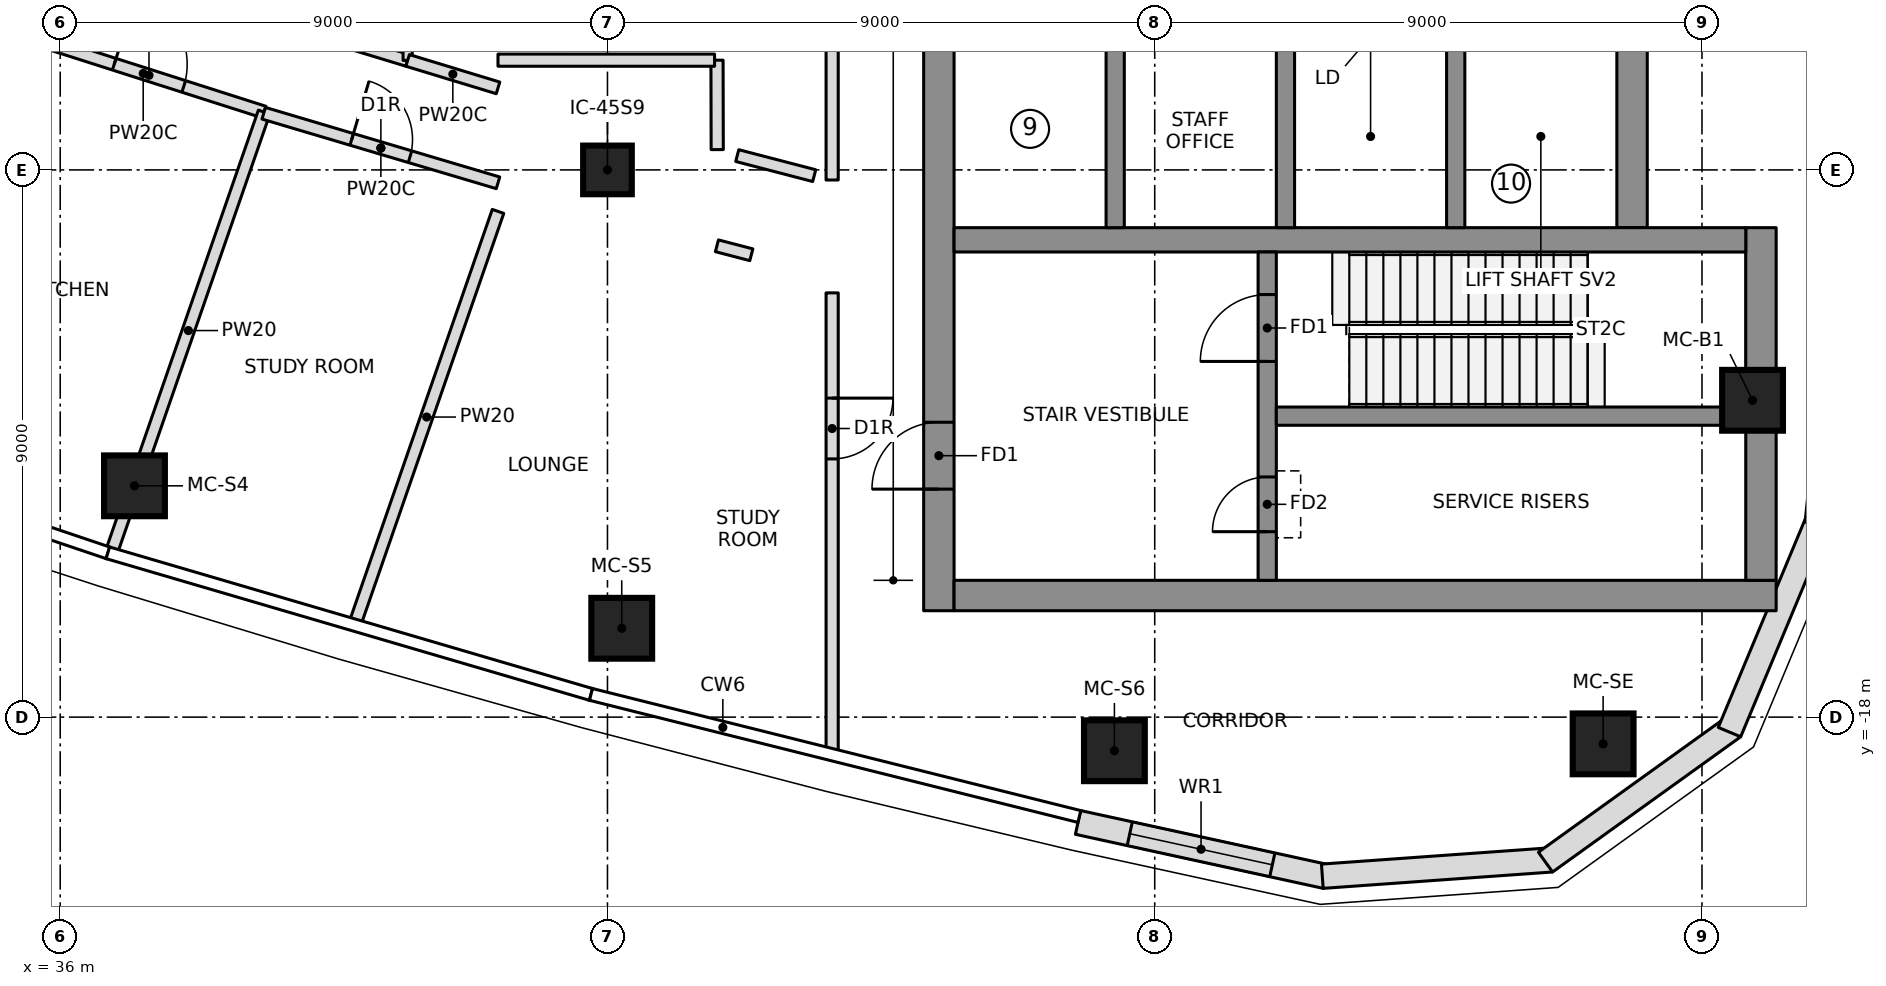
"""IFC4 building model, lengths in metres.
Left out: names, types, materials, properties, quantities, classifications, styles, units other than length and angle.
Written with IfcOpenShell. Run it as: python <this file> out.ifc"""

import sys

from ifc_helpers import new_model, si_unit, direction, frame, frame_2d, origin, origin_2d, place, context, subcontext, project, spatial, polyline, rectangle, outline, extrude, element, fill, save


model = new_model("IFC4")
c1 = context("Model", 3, precision=1e-05, world=origin(), true_north=direction((0.0, 1.0)))
c2 = subcontext(c1, "Body", "Model", "MODEL_VIEW")
j1 = project(units=[si_unit("LENGTHUNIT", "METRE"), si_unit("PLANEANGLEUNIT", "RADIAN")], contexts=[c1])
p1 = place(None, origin())
s1 = spatial("IfcSite", under=j1, at=p1, CompositionType="ELEMENT")
p2 = place(p1, origin())
s2 = spatial("IfcBuilding", under=s1, at=p2, CompositionType="ELEMENT")
p3 = place(p2, frame((0.0, 0.0, 313.2)))
s3 = spatial("IfcBuildingStorey", under=s2, at=p3, CompositionType="ELEMENT", Elevation=313.2)
p4 = place(p3, frame((50.45, -16.25, 0.0), z_axis=(0.0, 0.0, 1.0), x_axis=(0.0, 1.0, 0.0)))
e1 = element("IfcWall", 1, at=p4, inside=s3, PredefinedType="SHEAR", context=c2, shape_type="SweptSolid", body=[
    extrude(rectangle(XDim=9.6, YDim=0.5, at=frame_2d((4.8, 0.0))), origin(), (0.0, 0.0, 1.0), 5.4),
])
p5 = place(p4, frame((2.0, 0.0, 0.0)))
e2 = element("IfcOpeningElement", 2, at=p5, cuts=e1, PredefinedType="OPENING", context=c2, shape_type="SweptSolid", body=[
    extrude(rectangle(XDim=1.1, YDim=2.1, at=frame_2d((0.55, 1.05))), frame((0.0, 0.26, 0.0), z_axis=(0.0, -1.0, 0.0), x_axis=(1.0, 0.0, 0.0)), (0.0, 0.0, 1.0), 0.52),
])
p6 = place(p3, frame((50.7, -16.0, 0.0), z_axis=(0.0, 0.0, 1.0), x_axis=(1.0, 0.0, 0.0)))
e3 = element("IfcWall", 3, at=p6, inside=s3, PredefinedType="SHEAR", context=c2, shape_type="SweptSolid", body=[
    extrude(rectangle(XDim=13.52, YDim=0.5, at=frame_2d((6.76, 0.0))), origin(), (0.0, 0.0, 1.0), 5.4),
])
p7 = place(p3, frame((63.97, -15.75, 0.0), z_axis=(0.0, 0.0, 1.0), x_axis=(0.0, 1.0, 0.0)))
e4 = element("IfcWall", 4, at=p7, inside=s3, PredefinedType="SHEAR", context=c2, shape_type="SweptSolid", body=[
    extrude(rectangle(XDim=5.8, YDim=0.5, at=frame_2d((2.9, 0.0))), origin(), (0.0, 0.0, 1.0), 5.4),
])
p8 = place(p3, frame((61.85, -9.95, 0.0), z_axis=(0.0, 0.0, 1.0), x_axis=(0.0, 1.0, 0.0)))
e5 = element("IfcWall", 5, at=p8, inside=s3, PredefinedType="SHEAR", context=c2, shape_type="SweptSolid", body=[
    extrude(rectangle(XDim=19.9, YDim=0.5, at=frame_2d((9.95, 0.0))), origin(), (0.0, 0.0, 1.0), 5.4),
])
p9 = place(p3, frame((50.7, -10.15, 0.0), z_axis=(0.0, 0.0, 1.0), x_axis=(1.0, 0.0, 0.0)))
e6 = element("IfcWall", 6, at=p9, inside=s3, PredefinedType="SHEAR", context=c2, shape_type="SweptSolid", body=[
    extrude(rectangle(XDim=13.02, YDim=0.4, at=frame_2d((6.51, 0.0))), origin(), (0.0, 0.0, 1.0), 5.4),
])
for number, where, z_axis, x_axis in (
    (7, (53.35, -9.95, 0.0), (0.0, 0.0, 1.0), (0.0, 1.0, 0.0)),
    (8, (56.15, -9.95, 0.0), (0.0, 0.0, 1.0), (0.0, 1.0, 0.0)),
    (9, (58.95, -9.95, 0.0), (0.0, 0.0, 1.0), (0.0, 1.0, 0.0)),
):
    element("IfcWall", number, at=place(p3, frame(where, z_axis=z_axis, x_axis=x_axis)), inside=s3, PredefinedType="SHEAR", context=c2, shape_type="SweptSolid", body=[
        extrude(rectangle(XDim=3.0, YDim=0.3, at=frame_2d((1.5, 0.0))), origin(), (0.0, 0.0, 1.0), 5.4),
    ])
p10 = place(p3, frame((55.85, -15.75, 0.0), z_axis=(0.0, 0.0, 1.0), x_axis=(0.0, 1.0, 0.0)))
e10 = element("IfcWall", 10, at=p10, inside=s3, PredefinedType="SHEAR", context=c2, shape_type="SweptSolid", body=[
    extrude(rectangle(XDim=5.4, YDim=0.3, at=frame_2d((2.7, 0.0))), origin(), (0.0, 0.0, 1.0), 5.4),
])
p11 = place(p10, frame((3.6, 0.0, 0.0)))
e11 = element("IfcOpeningElement", 11, at=p11, cuts=e10, PredefinedType="OPENING", context=c2, shape_type="SweptSolid", body=[
    extrude(rectangle(XDim=1.1, YDim=2.1, at=frame_2d((0.55, 1.05))), frame((0.0, 0.16, 0.0), z_axis=(0.0, -1.0, 0.0), x_axis=(1.0, 0.0, 0.0)), (0.0, 0.0, 1.0), 0.32),
])
p12 = place(p10, frame((0.8, 0.0, 0.0)))
e12 = element("IfcOpeningElement", 12, at=p12, cuts=e10, PredefinedType="OPENING", context=c2, shape_type="SweptSolid", body=[
    extrude(rectangle(XDim=0.9, YDim=2.1, at=frame_2d((0.45, 1.05))), frame((0.0, 0.16, 0.0), z_axis=(0.0, -1.0, 0.0), x_axis=(1.0, 0.0, 0.0)), (0.0, 0.0, 1.0), 0.32),
])
p13 = place(p3, frame((56.0, -13.05, 0.0), z_axis=(0.0, 0.0, 1.0), x_axis=(1.0, 0.0, 0.0)))
e13 = element("IfcWall", 13, at=p13, inside=s3, PredefinedType="SHEAR", context=c2, shape_type="SweptSolid", body=[
    extrude(rectangle(XDim=7.72, YDim=0.3, at=frame_2d((3.86, 0.0))), origin(), (0.0, 0.0, 1.0), 5.4),
])
for number, where, z_axis, x_axis in (
    (14, (37.221, -14.196, 0.0), (0.0, 0.0, 1.0), (1.0, 0.0, 0.0)),
    (15, (45.235, -16.539, 0.0), (0.0, 0.0, 1.0), (1.0, 0.0, 0.0)),
    (16, (53.337, -18.553, 0.0), (0.0, 0.0, 1.0), (1.0, 0.0, 0.0)),
    (17, (61.374, -18.44, 0.0), (0.0, 0.0, 1.0), (1.0, 0.0, 0.0)),
    (18, (63.832, -12.789, 0.0), (0.0, 0.0, 1.0), (1.0, 0.0, 0.0)),
):
    element("IfcColumn", number, at=place(p3, frame(where, z_axis=z_axis, x_axis=x_axis)), inside=s3, PredefinedType="COLUMN", context=c2, shape_type="SweptSolid", body=[
        extrude(rectangle(XDim=1.0, YDim=1.0, at=origin_2d()), origin(), (0.0, 0.0, 1.0), 5.4),
    ])
p14 = place(p3, frame((45.0, -9.0, 0.0), z_axis=(0.0, 0.0, 1.0), x_axis=(1.0, 0.0, 0.0)))
e19 = element("IfcColumn", 19, at=p14, inside=s3, PredefinedType="COLUMN", context=c2, shape_type="SweptSolid", body=[
    extrude(rectangle(XDim=0.8, YDim=0.8, at=origin_2d()), origin(), (0.0, 0.0, 1.0), 5.4),
])
p15 = place(p3, frame((52.738, -19.732, 0.0), z_axis=(0.0, 0.0, 1.0), x_axis=(0.977020225348, -0.213146614471, 0.0)))
e20 = element("IfcWall", 20, at=p15, inside=s3, PredefinedType="NOTDEFINED", context=c2, shape_type="SweptSolid", body=[
    extrude(outline(polyline([(0.0, -0.2), (4.171, -0.2), (4.113, 0.2), (0.0, 0.2), (0.0, -0.2)])), origin(), (0.0, 0.0, 1.0), 5.1),
])
p16 = place(p15, frame((0.871, 0.0, 0.3)))
e21 = element("IfcOpeningElement", 21, at=p16, cuts=e20, PredefinedType="OPENING", context=c2, shape_type="SweptSolid", body=[
    extrude(rectangle(XDim=2.4, YDim=3.0, at=frame_2d((1.2, 1.5))), frame((0.0, 0.21, 0.0), z_axis=(0.0, -1.0, 0.0), x_axis=(1.0, 0.0, 0.0)), (0.0, 0.0, 1.0), 0.42),
])
p17 = place(p3, frame((56.785, -20.615, 0.0), z_axis=(0.0, 0.0, 1.0), x_axis=(0.99746272096, 0.071190731806, 0.0)))
e22 = element("IfcWall", 22, at=p17, inside=s3, PredefinedType="NOTDEFINED", context=c2, shape_type="SweptSolid", body=[
    extrude(outline(polyline([(-0.029, -0.2), (3.753, -0.2), (3.64, 0.2), (0.029, 0.2), (-0.029, -0.2)])), origin(), (0.0, 0.0, 1.0), 5.1),
])
p18 = place(p3, frame((60.472, -20.352, 0.0), z_axis=(0.0, 0.0, 1.0), x_axis=(0.811962548682, 0.583709533533, 0.0)))
e23 = element("IfcWall", 23, at=p18, inside=s3, PredefinedType="NOTDEFINED", context=c2, shape_type="SweptSolid", body=[
    extrude(outline(polyline([(-0.057, -0.2), (3.753, -0.2), (3.64, 0.2), (0.057, 0.2), (-0.057, -0.2)])), origin(), (0.0, 0.0, 1.0), 5.1),
])
p19 = place(p3, frame((63.474, -18.194, 0.0), z_axis=(0.0, 0.0, 1.0), x_axis=(0.385285857918, 0.922797273343, 0.0)))
e24 = element("IfcWall", 24, at=p19, inside=s3, PredefinedType="NOTDEFINED", context=c2, shape_type="SweptSolid", body=[
    extrude(outline(polyline([(-0.057, -0.2), (3.726, -0.2), (3.667, 0.2), (0.057, 0.2), (-0.057, -0.2)])), origin(), (0.0, 0.0, 1.0), 5.1),
])
p20 = place(p3, frame((64.898, -14.782, 0.0), z_axis=(0.0, 0.0, 1.0), x_axis=(0.102249826987, 0.994758751096, 0.0)))
e25 = element("IfcWall", 25, at=p20, inside=s3, PredefinedType="NOTDEFINED", context=c2, shape_type="SweptSolid", body=[
    extrude(outline(polyline([(-0.03, -0.2), (4.237, -0.2), (4.23, 0.2), (0.03, 0.2), (-0.03, -0.2)])), origin(), (0.0, 0.0, 1.0), 5.1),
])
p21 = place(p20, frame((1.417, 0.0, 0.3)))
e26 = element("IfcOpeningElement", 26, at=p21, cuts=e25, PredefinedType="OPENING", context=c2, shape_type="SweptSolid", body=[
    extrude(rectangle(XDim=2.4, YDim=3.0, at=frame_2d((1.2, 1.5))), frame((0.0, 0.21, 0.0), z_axis=(0.0, -1.0, 0.0), x_axis=(1.0, 0.0, 0.0)), (0.0, 0.0, 1.0), 0.42),
])
p22 = place(p3, frame((35.376, -6.779, 0.0), z_axis=(0.0, 0.0, 1.0), x_axis=(0.952572699992, -0.304311109278, 0.0)))
e27 = element("IfcWall", 27, at=p22, inside=s3, PredefinedType="PARTITIONING", context=c2, shape_type="SweptSolid", body=[
    extrude(rectangle(XDim=4.176, YDim=0.2, at=frame_2d((2.088, 0.0))), origin(), (0.0, 0.0, 1.0), 5.1),
])
p23 = place(p22, frame((1.588, 0.0, 0.0)))
e28 = element("IfcOpeningElement", 28, at=p23, cuts=e27, PredefinedType="OPENING", context=c2, shape_type="SweptSolid", body=[
    extrude(rectangle(XDim=1.2, YDim=2.1, at=frame_2d((0.6, 1.05))), frame((0.0, 0.11, 0.0), z_axis=(0.0, -1.0, 0.0), x_axis=(1.0, 0.0, 0.0)), (0.0, 0.0, 1.0), 0.22),
])
p24 = place(p3, frame((36.861, -15.235, 0.0), z_axis=(0.0, 0.0, 1.0), x_axis=(0.327741126954, 0.944767565967, 0.0)))
e29 = element("IfcWall", 29, at=p24, inside=s3, PredefinedType="PARTITIONING", context=c2, shape_type="SweptSolid", body=[
    extrude(rectangle(XDim=7.606, YDim=0.2, at=frame_2d((3.803, 0.0))), origin(), (0.0, 0.0, 1.0), 5.1),
])
p25 = place(p3, frame((39.347, -8.068, 0.0), z_axis=(0.0, 0.0, 1.0), x_axis=(0.958623301067, -0.284677653938, 0.0)))
e30 = element("IfcWall", 30, at=p25, inside=s3, PredefinedType="PARTITIONING", context=c2, shape_type="SweptSolid", body=[
    extrude(rectangle(XDim=4.02, YDim=0.2, at=frame_2d((2.01, 0.0))), origin(), (0.0, 0.0, 1.0), 5.1),
])
p26 = place(p25, frame((1.51, 0.0, 0.0)))
e31 = element("IfcOpeningElement", 31, at=p26, cuts=e30, PredefinedType="OPENING", context=c2, shape_type="SweptSolid", body=[
    extrude(rectangle(XDim=1.0, YDim=2.1, at=frame_2d((0.5, 1.05))), frame((0.0, 0.11, 0.0), z_axis=(0.0, -1.0, 0.0), x_axis=(1.0, 0.0, 0.0)), (0.0, 0.0, 1.0), 0.22),
])
p27 = place(p3, frame((40.854, -16.447, 0.0), z_axis=(0.0, 0.0, 1.0), x_axis=(0.327701896972, 0.944781173987, 0.0)))
e32 = element("IfcWall", 32, at=p27, inside=s3, PredefinedType="PARTITIONING", context=c2, shape_type="SweptSolid", body=[
    extrude(rectangle(XDim=7.16, YDim=0.2, at=frame_2d((3.58, 0.0))), origin(), (0.0, 0.0, 1.0), 5.1),
])
p28 = place(p3, frame((46.8, -10.248, 0.0), z_axis=(0.0, 0.0, 1.0), x_axis=(0.967635017449, -0.252353864654, 0.0)))
e33 = element("IfcWall", 33, at=p28, inside=s3, PredefinedType="PARTITIONING", context=c2, shape_type="SweptSolid", body=[
    extrude(rectangle(XDim=0.584, YDim=0.2, at=frame_2d((0.292, 0.0))), origin(), (0.0, 0.0, 1.0), 5.1),
])
p29 = place(p3, frame((41.714, -7.199, 0.0), z_axis=(0.0, 0.0, 1.0), x_axis=(-0.956735130354, 0.290960289981, 0.0)))
e34 = element("IfcWall", 34, at=p29, inside=s3, PredefinedType="PARTITIONING", context=c2, shape_type="SweptSolid", body=[
    extrude(rectangle(XDim=2.268, YDim=0.2, at=frame_2d((1.134, 0.0))), origin(), (0.0, 0.0, 1.0), 5.1),
])
p30 = place(p3, frame((41.714, -7.199, 0.0), z_axis=(0.0, 0.0, 1.0), x_axis=(0.0, 1.0, 0.0)))
e35 = element("IfcWall", 35, at=p30, inside=s3, PredefinedType="PARTITIONING", context=c2, shape_type="SweptSolid", body=[
    extrude(rectangle(XDim=14.398, YDim=0.15, at=frame_2d((7.199, 0.0))), origin(), (0.0, 0.0, 1.0), 5.1),
])
p31 = place(p3, frame((43.2, -7.651, 0.0), z_axis=(0.0, 0.0, 1.0), x_axis=(-0.956755682532, 0.290892701769, 0.0)))
e36 = element("IfcWall", 36, at=p31, inside=s3, PredefinedType="PARTITIONING", context=c2, shape_type="SweptSolid", body=[
    extrude(rectangle(XDim=1.553, YDim=0.2, at=frame_2d((0.777, 0.0))), origin(), (0.0, 0.0, 1.0), 5.1),
])
p32 = place(p3, frame((48.4, -9.094, 0.0), z_axis=(0.0, 0.0, 1.0), x_axis=(-0.967678694968, 0.252186326563, 0.0)))
e37 = element("IfcWall", 37, at=p32, inside=s3, PredefinedType="PARTITIONING", context=c2, shape_type="SweptSolid", body=[
    extrude(rectangle(XDim=1.308, YDim=0.2, at=frame_2d((0.654, 0.0))), origin(), (0.0, 0.0, 1.0), 5.1),
])
p33 = place(p3, frame((48.695, -11.022, 0.0), z_axis=(0.0, 0.0, 1.0), x_axis=(0.0, -1.0, 0.0)))
e38 = element("IfcWall", 38, at=p33, inside=s3, PredefinedType="PARTITIONING", context=c2, shape_type="SweptSolid", body=[
    extrude(rectangle(XDim=7.567, YDim=0.2, at=frame_2d((3.783, 0.0))), origin(), (0.0, 0.0, 1.0), 5.1),
])
p34 = place(p33, frame((1.731, 0.0, 0.0)))
e39 = element("IfcOpeningElement", 39, at=p34, cuts=e38, PredefinedType="OPENING", context=c2, shape_type="SweptSolid", body=[
    extrude(rectangle(XDim=1.0, YDim=2.1, at=frame_2d((0.5, 1.05))), frame((0.0, 0.11, 0.0), z_axis=(0.0, -1.0, 0.0), x_axis=(1.0, 0.0, 0.0)), (0.0, 0.0, 1.0), 0.22),
])
p35 = place(p3, frame((48.695, 9.166, 0.0), z_axis=(0.0, 0.0, 1.0), x_axis=(0.0, -1.0, 0.0)))
e40 = element("IfcWall", 40, at=p35, inside=s3, PredefinedType="PARTITIONING", context=c2, shape_type="SweptSolid", body=[
    extrude(rectangle(XDim=18.332, YDim=0.2, at=frame_2d((9.166, 0.0))), origin(), (0.0, 0.0, 1.0), 5.1),
])
p36 = place(p3, frame((46.805, -8.666, 0.0), z_axis=(0.0, 0.0, 1.0), x_axis=(-0.002323645179, 0.999997300333, 0.0)))
e41 = element("IfcWall", 41, at=p36, inside=s3, PredefinedType="PARTITIONING", context=c2, shape_type="SweptSolid", body=[
    extrude(rectangle(XDim=1.471, YDim=0.2, at=frame_2d((0.735, 0.0))), origin(), (0.0, 0.0, 1.0), 5.1),
])
p37 = place(p3, frame((46.761, -7.195, 0.0), z_axis=(0.0, 0.0, 1.0), x_axis=(-0.999999997651, 6.8540096e-05, 0.0)))
e42 = element("IfcWall", 42, at=p37, inside=s3, PredefinedType="PARTITIONING", context=c2, shape_type="SweptSolid", body=[
    extrude(rectangle(XDim=3.562, YDim=0.2, at=frame_2d((1.781, 0.0))), origin(), (0.0, 0.0, 1.0), 5.1),
])
p38 = place(p16, origin())
e43 = element("IfcWindow", 43, at=p38, inside=s3, PartitioningType="SINGLE_PANEL", PredefinedType="WINDOW", context=c2, shape_type="SweptSolid", body=[
    extrude(rectangle(XDim=2.4, YDim=3.0, at=frame_2d((1.2, 1.5))), frame((0.0, 0.17, 0.0), z_axis=(0.0, -1.0, 0.0), x_axis=(1.0, 0.0, 0.0)), (0.0, 0.0, 1.0), 0.06),
])
fill(e21, e43)
p39 = place(p23, origin())
e44 = element("IfcDoor", 44, at=p39, inside=s3, OperationType="SINGLE_SWING_RIGHT", PredefinedType="DOOR", context=c2, shape_type="SweptSolid", body=[
    extrude(rectangle(XDim=1.2, YDim=2.1, at=frame_2d((0.6, 1.05))), frame((0.0, 0.025, 0.0), z_axis=(0.0, -1.0, 0.0), x_axis=(1.0, 0.0, 0.0)), (0.0, 0.0, 1.0), 0.05),
])
fill(e28, e44)
p40 = place(p26, origin())
e45 = element("IfcDoor", 45, at=p40, inside=s3, OperationType="SINGLE_SWING_RIGHT", PredefinedType="DOOR", context=c2, shape_type="SweptSolid", body=[
    extrude(rectangle(XDim=1.0, YDim=2.1, at=frame_2d((0.5, 1.05))), frame((0.0, 0.025, 0.0), z_axis=(0.0, -1.0, 0.0), x_axis=(1.0, 0.0, 0.0)), (0.0, 0.0, 1.0), 0.05),
])
fill(e31, e45)
p41 = place(p34, origin())
e46 = element("IfcDoor", 46, at=p41, inside=s3, OperationType="SINGLE_SWING_RIGHT", PredefinedType="DOOR", context=c2, shape_type="SweptSolid", body=[
    extrude(rectangle(XDim=1.0, YDim=2.1, at=frame_2d((0.5, 1.05))), frame((0.0, 0.025, 0.0), z_axis=(0.0, -1.0, 0.0), x_axis=(1.0, 0.0, 0.0)), (0.0, 0.0, 1.0), 0.05),
])
fill(e39, e46)
p42 = place(p11, origin())
e47 = element("IfcDoor", 47, at=p42, inside=s3, OperationType="SINGLE_SWING_RIGHT", PredefinedType="DOOR", context=c2, shape_type="SweptSolid", body=[
    extrude(rectangle(XDim=1.1, YDim=2.1, at=frame_2d((0.55, 1.05))), frame((0.0, 0.025, 0.0), z_axis=(0.0, -1.0, 0.0), x_axis=(1.0, 0.0, 0.0)), (0.0, 0.0, 1.0), 0.05),
])
fill(e11, e47)
p43 = place(p5, origin())
e48 = element("IfcDoor", 48, at=p43, inside=s3, OperationType="SINGLE_SWING_RIGHT", PredefinedType="DOOR", context=c2, shape_type="SweptSolid", body=[
    extrude(rectangle(XDim=1.1, YDim=2.1, at=frame_2d((0.55, 1.05))), frame((0.0, 0.025, 0.0), z_axis=(0.0, -1.0, 0.0), x_axis=(1.0, 0.0, 0.0)), (0.0, 0.0, 1.0), 0.05),
])
fill(e2, e48)
p44 = place(p12, origin())
e49 = element("IfcDoor", 49, at=p44, inside=s3, OperationType="SINGLE_SWING_LEFT", PredefinedType="DOOR", context=c2, shape_type="SweptSolid", body=[
    extrude(rectangle(XDim=0.9, YDim=2.1, at=frame_2d((0.45, 1.05))), frame((0.0, 0.025, 0.0), z_axis=(0.0, -1.0, 0.0), x_axis=(1.0, 0.0, 0.0)), (0.0, 0.0, 1.0), 0.05),
])
fill(e12, e49)
save(model, sys.argv[1])
